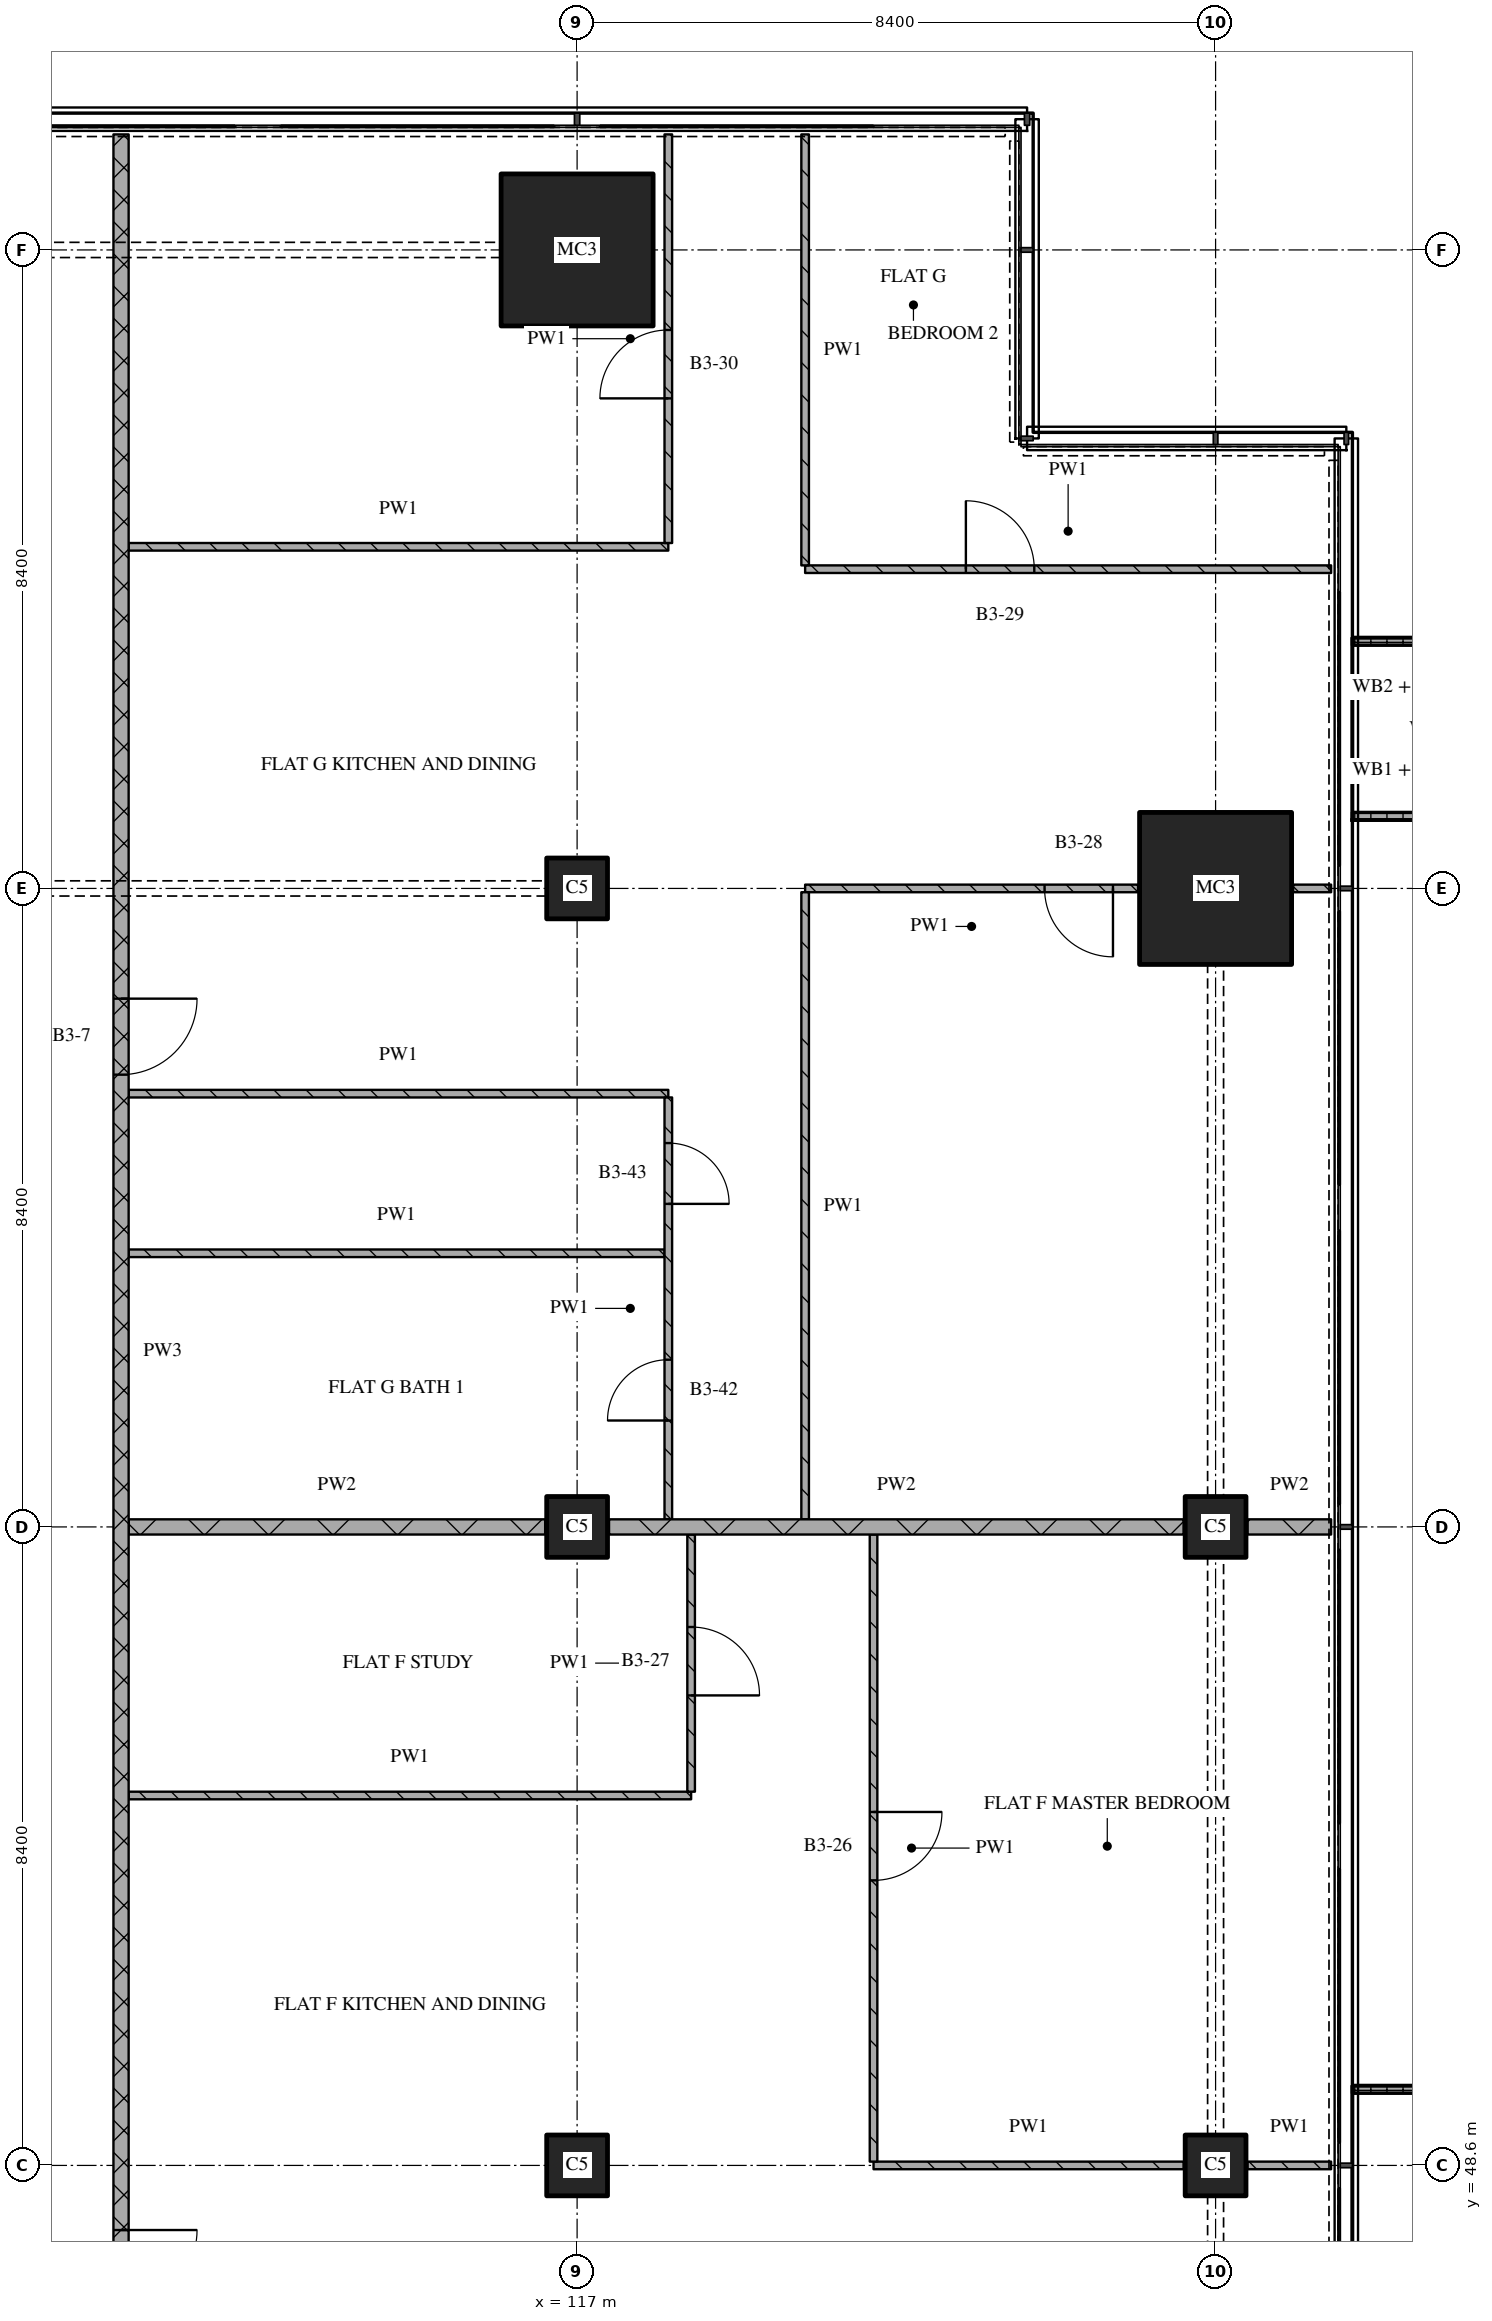
"""IFC4 building model, lengths in metres.
Left out: names, types, materials, properties, quantities, classifications, styles, units other than length and angle.
Written with IfcOpenShell. Run it as: python <this file> out.ifc"""

import sys

from ifc_helpers import new_model, si_unit, direction, frame, frame_2d, origin, origin_2d, place, context, subcontext, project, spatial, polyline, rectangle, outline, extrude, element, fill, save


model = new_model("IFC4")
c1 = context("Model", 3, precision=1e-05, world=origin(), true_north=direction((0.0, 1.0)))
c2 = subcontext(c1, "Body", "Model", "MODEL_VIEW")
j1 = project(units=[si_unit("LENGTHUNIT", "METRE"), si_unit("PLANEANGLEUNIT", "RADIAN")], contexts=[c1])
p1 = place(None, origin())
s1 = spatial("IfcSite", under=j1, at=p1, CompositionType="ELEMENT")
p2 = place(p1, origin())
s2 = spatial("IfcBuilding", under=s1, at=p2, CompositionType="ELEMENT")
p3 = place(p2, frame((0.0, 0.0, 120.45)))
s3 = spatial("IfcBuildingStorey", under=s2, at=p3, CompositionType="ELEMENT", Elevation=120.45)
for number, where, z_axis, x_axis in (
    (1, (117.0, 48.6, 0.0), (0.0, 0.0, 1.0), (1.0, 0.0, 0.0)),
    (2, (117.0, 57.0, 0.0), (0.0, 0.0, 1.0), (1.0, 0.0, 0.0)),
    (3, (117.0, 65.4, 0.0), (0.0, 0.0, 1.0), (1.0, 0.0, 0.0)),
):
    element("IfcColumn", number, at=place(p3, frame(where, z_axis=z_axis, x_axis=x_axis)), inside=s3, PredefinedType="COLUMN", context=c2, shape_type="SweptSolid", body=[
        extrude(rectangle(XDim=0.8, YDim=0.8, at=origin_2d()), origin(), (0.0, 0.0, 1.0), 3.6),
    ])
p4 = place(p3, frame((117.0, 73.8, 0.0), z_axis=(0.0, 0.0, 1.0), x_axis=(1.0, 0.0, 0.0)))
e4 = element("IfcColumn", 4, at=p4, inside=s3, PredefinedType="COLUMN", context=c2, shape_type="SweptSolid", body=[
    extrude(rectangle(XDim=2.0, YDim=2.0, at=origin_2d()), origin(), (0.0, 0.0, 1.0), 3.6),
])
for number, where, z_axis, x_axis in (
    (5, (125.4, 48.6, 0.0), (0.0, 0.0, 1.0), (1.0, 0.0, 0.0)),
    (6, (125.4, 57.0, 0.0), (0.0, 0.0, 1.0), (1.0, 0.0, 0.0)),
):
    element("IfcColumn", number, at=place(p3, frame(where, z_axis=z_axis, x_axis=x_axis)), inside=s3, PredefinedType="COLUMN", context=c2, shape_type="SweptSolid", body=[
        extrude(rectangle(XDim=0.8, YDim=0.8, at=origin_2d()), origin(), (0.0, 0.0, 1.0), 3.6),
    ])
p5 = place(p3, frame((125.4, 65.4, 0.0), z_axis=(0.0, 0.0, 1.0), x_axis=(1.0, 0.0, 0.0)))
e7 = element("IfcColumn", 7, at=p5, inside=s3, PredefinedType="COLUMN", context=c2, shape_type="SweptSolid", body=[
    extrude(rectangle(XDim=2.0, YDim=2.0, at=origin_2d()), origin(), (0.0, 0.0, 1.0), 3.6),
])
p6 = place(p3, origin())
e8 = element("IfcWall", 8, at=p6, inside=s3, PredefinedType="SOLIDWALL", context=c2, shape_type="SweptSolid", body=[
    extrude(outline(polyline([(127.2, 43.35), (127.2, 43.45), (128.967, 43.45), (128.967, 49.55), (127.2, 49.55), (127.2, 49.65), (129.067, 49.65), (129.067, 43.35), (127.2, 43.35)])), origin(), (0.0, 0.0, 1.0), 1.0),
])
p7 = place(p3, origin())
e9 = element("IfcWall", 9, at=p7, inside=s3, PredefinedType="SOLIDWALL", context=c2, shape_type="SweptSolid", body=[
    extrude(outline(polyline([(127.2, 66.3), (127.2, 66.4), (128.7, 66.4), (128.7, 68.6), (127.2, 68.6), (127.2, 68.7), (128.8, 68.7), (128.8, 66.3), (127.2, 66.3)])), origin(), (0.0, 0.0, 1.0), 1.0),
])
p8 = place(p3, frame((120.9, 48.6, 0.0), z_axis=(0.0, 0.0, 1.0), x_axis=(1.0, 0.0, 0.0)))
e10 = element("IfcWall", 10, at=p8, inside=s3, PredefinedType="PARTITIONING", context=c2, shape_type="SweptSolid", body=[
    extrude(rectangle(XDim=4.08, YDim=0.1, at=frame_2d((2.04, 0.0))), origin(), (0.0, 0.0, 1.0), 3.32),
])
p9 = place(p3, frame((125.82, 48.6, 0.0), z_axis=(0.0, 0.0, 1.0), x_axis=(1.0, 0.0, 0.0)))
e11 = element("IfcWall", 11, at=p9, inside=s3, PredefinedType="PARTITIONING", context=c2, shape_type="SweptSolid", body=[
    extrude(rectangle(XDim=1.1, YDim=0.1, at=frame_2d((0.55, 0.0))), origin(), (0.0, 0.0, 1.0), 3.32),
])
p10 = place(p3, frame((111.1, 53.467, 0.0), z_axis=(0.0, 0.0, 1.0), x_axis=(1.0, 0.0, 0.0)))
e12 = element("IfcWall", 12, at=p10, inside=s3, PredefinedType="PARTITIONING", context=c2, shape_type="SweptSolid", body=[
    extrude(rectangle(XDim=7.4, YDim=0.1, at=frame_2d((3.7, 0.0))), origin(), (0.0, 0.0, 1.0), 3.32),
])
p11 = place(p3, frame((111.1, 57.0, 0.0), z_axis=(0.0, 0.0, 1.0), x_axis=(1.0, 0.0, 0.0)))
e13 = element("IfcWall", 13, at=p11, inside=s3, PredefinedType="PARTITIONING", context=c2, shape_type="SweptSolid", body=[
    extrude(rectangle(XDim=5.48, YDim=0.2, at=frame_2d((2.74, 0.0))), origin(), (0.0, 0.0, 1.0), 3.32),
])
p12 = place(p3, frame((117.42, 57.0, 0.0), z_axis=(0.0, 0.0, 1.0), x_axis=(1.0, 0.0, 0.0)))
e14 = element("IfcWall", 14, at=p12, inside=s3, PredefinedType="PARTITIONING", context=c2, shape_type="SweptSolid", body=[
    extrude(rectangle(XDim=7.56, YDim=0.2, at=frame_2d((3.78, 0.0))), origin(), (0.0, 0.0, 1.0), 3.32),
])
p13 = place(p3, frame((125.82, 57.0, 0.0), z_axis=(0.0, 0.0, 1.0), x_axis=(1.0, 0.0, 0.0)))
e15 = element("IfcWall", 15, at=p13, inside=s3, PredefinedType="PARTITIONING", context=c2, shape_type="SweptSolid", body=[
    extrude(rectangle(XDim=1.1, YDim=0.2, at=frame_2d((0.55, 0.0))), origin(), (0.0, 0.0, 1.0), 3.32),
])
p14 = place(p3, frame((111.1, 60.6, 0.0), z_axis=(0.0, 0.0, 1.0), x_axis=(1.0, 0.0, 0.0)))
e16 = element("IfcWall", 16, at=p14, inside=s3, PredefinedType="PARTITIONING", context=c2, shape_type="SweptSolid", body=[
    extrude(rectangle(XDim=7.05, YDim=0.1, at=frame_2d((3.525, 0.0))), origin(), (0.0, 0.0, 1.0), 3.32),
])
p15 = place(p3, frame((111.1, 62.7, 0.0), z_axis=(0.0, 0.0, 1.0), x_axis=(1.0, 0.0, 0.0)))
e17 = element("IfcWall", 17, at=p15, inside=s3, PredefinedType="PARTITIONING", context=c2, shape_type="SweptSolid", body=[
    extrude(rectangle(XDim=7.1, YDim=0.1, at=frame_2d((3.55, 0.0))), origin(), (0.0, 0.0, 1.0), 3.32),
])
p16 = place(p3, frame((124.38, 65.4, 0.0), z_axis=(0.0, 0.0, 1.0), x_axis=(-1.0, 0.0, 0.0)))
e18 = element("IfcWall", 18, at=p16, inside=s3, PredefinedType="PARTITIONING", context=c2, shape_type="SweptSolid", body=[
    extrude(rectangle(XDim=4.38, YDim=0.1, at=frame_2d((2.19, 0.0))), origin(), (0.0, 0.0, 1.0), 3.32),
])
p17 = place(p16, frame((0.33, 0.0, 0.0)))
e19 = element("IfcOpeningElement", 19, at=p17, cuts=e18, PredefinedType="OPENING", context=c2, shape_type="SweptSolid", body=[
    extrude(rectangle(XDim=0.9, YDim=2.1, at=frame_2d((0.45, 1.05))), frame((0.0, 0.06, 0.0), z_axis=(0.0, -1.0, 0.0), x_axis=(1.0, 0.0, 0.0)), (0.0, 0.0, 1.0), 0.12),
])
p18 = place(p3, frame((126.42, 65.4, 0.0), z_axis=(0.0, 0.0, 1.0), x_axis=(1.0, 0.0, 0.0)))
e20 = element("IfcWall", 20, at=p18, inside=s3, PredefinedType="PARTITIONING", context=c2, shape_type="SweptSolid", body=[
    extrude(rectangle(XDim=0.5, YDim=0.1, at=frame_2d((0.25, 0.0))), origin(), (0.0, 0.0, 1.0), 3.32),
])
p19 = place(p3, frame((120.0, 69.6, 0.0), z_axis=(0.0, 0.0, 1.0), x_axis=(1.0, 0.0, 0.0)))
e21 = element("IfcWall", 21, at=p19, inside=s3, PredefinedType="PARTITIONING", context=c2, shape_type="SweptSolid", body=[
    extrude(rectangle(XDim=6.92, YDim=0.1, at=frame_2d((3.46, 0.0))), origin(), (0.0, 0.0, 1.0), 3.32),
])
p20 = place(p19, frame((2.115, 0.0, 0.0)))
e22 = element("IfcOpeningElement", 22, at=p20, cuts=e21, PredefinedType="OPENING", context=c2, shape_type="SweptSolid", body=[
    extrude(rectangle(XDim=0.9, YDim=2.1, at=frame_2d((0.45, 1.05))), frame((0.0, 0.06, 0.0), z_axis=(0.0, -1.0, 0.0), x_axis=(1.0, 0.0, 0.0)), (0.0, 0.0, 1.0), 0.12),
])
p21 = place(p3, frame((111.1, 69.894, 0.0), z_axis=(0.0, 0.0, 1.0), x_axis=(1.0, 0.0, 0.0)))
e23 = element("IfcWall", 23, at=p21, inside=s3, PredefinedType="PARTITIONING", context=c2, shape_type="SweptSolid", body=[
    extrude(rectangle(XDim=7.1, YDim=0.1, at=frame_2d((3.55, 0.0))), origin(), (0.0, 0.0, 1.0), 3.32),
])
p22 = place(p3, frame((111.0, 75.32, 0.0), z_axis=(0.0, 0.0, 1.0), x_axis=(0.0, -1.0, 0.0)))
e24 = element("IfcWall", 24, at=p22, inside=s3, PredefinedType="PARTITIONING", context=c2, shape_type="SweptSolid", body=[
    extrude(rectangle(XDim=32.02, YDim=0.2, at=frame_2d((16.01, 0.0))), origin(), (0.0, 0.0, 1.0), 3.32),
])
p23 = place(p22, frame((11.37, 0.0, 0.0)))
e25 = element("IfcOpeningElement", 25, at=p23, cuts=e24, PredefinedType="OPENING", context=c2, shape_type="SweptSolid", body=[
    extrude(rectangle(XDim=1.0, YDim=2.1, at=frame_2d((0.5, 1.05))), frame((0.0, 0.11, 0.0), z_axis=(0.0, -1.0, 0.0), x_axis=(1.0, 0.0, 0.0)), (0.0, 0.0, 1.0), 0.22),
])
p24 = place(p22, frame((27.57, 0.0, 0.0)))
e26 = element("IfcOpeningElement", 26, at=p24, cuts=e24, PredefinedType="OPENING", context=c2, shape_type="SweptSolid", body=[
    extrude(rectangle(XDim=1.0, YDim=2.1, at=frame_2d((0.5, 1.05))), frame((0.0, 0.11, 0.0), z_axis=(0.0, -1.0, 0.0), x_axis=(1.0, 0.0, 0.0)), (0.0, 0.0, 1.0), 0.22),
])
p25 = place(p3, frame((118.2, 57.1, 0.0), z_axis=(0.0, 0.0, 1.0), x_axis=(0.0, 1.0, 0.0)))
e27 = element("IfcWall", 27, at=p25, inside=s3, PredefinedType="PARTITIONING", context=c2, shape_type="SweptSolid", body=[
    extrude(rectangle(XDim=5.55, YDim=0.1, at=frame_2d((2.775, 0.0))), origin(), (0.0, 0.0, 1.0), 3.32),
])
p26 = place(p25, frame((1.3, 0.0, 0.0)))
e28 = element("IfcOpeningElement", 28, at=p26, cuts=e27, PredefinedType="OPENING", context=c2, shape_type="SweptSolid", body=[
    extrude(rectangle(XDim=0.8, YDim=2.1, at=frame_2d((0.4, 1.05))), frame((0.0, 0.06, 0.0), z_axis=(0.0, -1.0, 0.0), x_axis=(1.0, 0.0, 0.0)), (0.0, 0.0, 1.0), 0.12),
])
p27 = place(p25, frame((4.15, 0.0, 0.0)))
e29 = element("IfcOpeningElement", 29, at=p27, cuts=e27, PredefinedType="OPENING", context=c2, shape_type="SweptSolid", body=[
    extrude(rectangle(XDim=0.8, YDim=2.1, at=frame_2d((0.4, 1.05))), frame((0.0, 0.06, 0.0), z_axis=(0.0, -1.0, 0.0), x_axis=(1.0, 0.0, 0.0)), (0.0, 0.0, 1.0), 0.12),
])
p28 = place(p3, frame((118.2, 69.944, 0.0), z_axis=(0.0, 0.0, 1.0), x_axis=(0.0, 1.0, 0.0)))
e30 = element("IfcWall", 30, at=p28, inside=s3, PredefinedType="PARTITIONING", context=c2, shape_type="SweptSolid", body=[
    extrude(rectangle(XDim=5.376, YDim=0.1, at=frame_2d((2.688, 0.0))), origin(), (0.0, 0.0, 1.0), 3.32),
])
p29 = place(p28, frame((1.903, 0.0, 0.0)))
e31 = element("IfcOpeningElement", 31, at=p29, cuts=e30, PredefinedType="OPENING", context=c2, shape_type="SweptSolid", body=[
    extrude(rectangle(XDim=0.9, YDim=2.1, at=frame_2d((0.45, 1.05))), frame((0.0, 0.06, 0.0), z_axis=(0.0, -1.0, 0.0), x_axis=(1.0, 0.0, 0.0)), (0.0, 0.0, 1.0), 0.12),
])
p30 = place(p3, frame((118.5, 53.517, 0.0), z_axis=(0.0, 0.0, 1.0), x_axis=(0.0, 1.0, 0.0)))
e32 = element("IfcWall", 32, at=p30, inside=s3, PredefinedType="PARTITIONING", context=c2, shape_type="SweptSolid", body=[
    extrude(rectangle(XDim=3.383, YDim=0.1, at=frame_2d((1.692, 0.0))), origin(), (0.0, 0.0, 1.0), 3.32),
])
p31 = place(p30, frame((1.267, 0.0, 0.0)))
e33 = element("IfcOpeningElement", 33, at=p31, cuts=e32, PredefinedType="OPENING", context=c2, shape_type="SweptSolid", body=[
    extrude(rectangle(XDim=0.9, YDim=2.1, at=frame_2d((0.45, 1.05))), frame((0.0, 0.06, 0.0), z_axis=(0.0, -1.0, 0.0), x_axis=(1.0, 0.0, 0.0)), (0.0, 0.0, 1.0), 0.12),
])
p32 = place(p3, frame((120.0, 65.35, 0.0), z_axis=(0.0, 0.0, 1.0), x_axis=(0.0, -1.0, 0.0)))
e34 = element("IfcWall", 34, at=p32, inside=s3, PredefinedType="PARTITIONING", context=c2, shape_type="SweptSolid", body=[
    extrude(rectangle(XDim=8.25, YDim=0.1, at=frame_2d((4.125, 0.0))), origin(), (0.0, 0.0, 1.0), 3.32),
])
p33 = place(p3, frame((120.0, 75.32, 0.0), z_axis=(0.0, 0.0, 1.0), x_axis=(0.0, -1.0, 0.0)))
e35 = element("IfcWall", 35, at=p33, inside=s3, PredefinedType="PARTITIONING", context=c2, shape_type="SweptSolid", body=[
    extrude(rectangle(XDim=5.67, YDim=0.1, at=frame_2d((2.835, 0.0))), origin(), (0.0, 0.0, 1.0), 3.32),
])
p34 = place(p3, frame((120.9, 56.9, 0.0), z_axis=(0.0, 0.0, 1.0), x_axis=(0.0, -1.0, 0.0)))
e36 = element("IfcWall", 36, at=p34, inside=s3, PredefinedType="PARTITIONING", context=c2, shape_type="SweptSolid", body=[
    extrude(rectangle(XDim=8.25, YDim=0.1, at=frame_2d((4.125, 0.0))), origin(), (0.0, 0.0, 1.0), 3.32),
])
p35 = place(p34, frame((3.65, 0.0, 0.0)))
e37 = element("IfcOpeningElement", 37, at=p35, cuts=e36, PredefinedType="OPENING", context=c2, shape_type="SweptSolid", body=[
    extrude(rectangle(XDim=0.9, YDim=2.1, at=frame_2d((0.45, 1.05))), frame((0.0, 0.06, 0.0), z_axis=(0.0, -1.0, 0.0), x_axis=(1.0, 0.0, 0.0)), (0.0, 0.0, 1.0), 0.12),
])
p36 = place(p17, origin())
e38 = element("IfcDoor", 38, at=p36, inside=s3, OperationType="SINGLE_SWING_LEFT", PredefinedType="DOOR", context=c2, shape_type="SweptSolid", body=[
    extrude(rectangle(XDim=0.9, YDim=2.1, at=frame_2d((0.45, 1.05))), frame((0.0, 0.025, 0.0), z_axis=(0.0, -1.0, 0.0), x_axis=(1.0, 0.0, 0.0)), (0.0, 0.0, 1.0), 0.05),
])
fill(e19, e38)
p37 = place(p20, origin())
e39 = element("IfcDoor", 39, at=p37, inside=s3, OperationType="SINGLE_SWING_LEFT", PredefinedType="DOOR", context=c2, shape_type="SweptSolid", body=[
    extrude(rectangle(XDim=0.9, YDim=2.1, at=frame_2d((0.45, 1.05))), frame((0.0, 0.025, 0.0), z_axis=(0.0, -1.0, 0.0), x_axis=(1.0, 0.0, 0.0)), (0.0, 0.0, 1.0), 0.05),
])
fill(e22, e39)
p38 = place(p23, origin())
e40 = element("IfcDoor", 40, at=p38, inside=s3, OperationType="SINGLE_SWING_LEFT", PredefinedType="DOOR", context=c2, shape_type="SweptSolid", body=[
    extrude(rectangle(XDim=1.0, YDim=2.1, at=frame_2d((0.5, 1.05))), frame((0.0, 0.025, 0.0), z_axis=(0.0, -1.0, 0.0), x_axis=(1.0, 0.0, 0.0)), (0.0, 0.0, 1.0), 0.05),
])
fill(e25, e40)
p39 = place(p24, origin())
e41 = element("IfcDoor", 41, at=p39, inside=s3, OperationType="SINGLE_SWING_LEFT", PredefinedType="DOOR", context=c2, shape_type="SweptSolid", body=[
    extrude(rectangle(XDim=1.0, YDim=2.1, at=frame_2d((0.5, 1.05))), frame((0.0, 0.025, 0.0), z_axis=(0.0, -1.0, 0.0), x_axis=(1.0, 0.0, 0.0)), (0.0, 0.0, 1.0), 0.05),
])
fill(e26, e41)
p40 = place(p26, origin())
e42 = element("IfcDoor", 42, at=p40, inside=s3, OperationType="SINGLE_SWING_LEFT", PredefinedType="DOOR", context=c2, shape_type="SweptSolid", body=[
    extrude(rectangle(XDim=0.8, YDim=2.1, at=frame_2d((0.4, 1.05))), frame((0.0, 0.025, 0.0), z_axis=(0.0, -1.0, 0.0), x_axis=(1.0, 0.0, 0.0)), (0.0, 0.0, 1.0), 0.05),
])
fill(e28, e42)
p41 = place(p27, origin())
e43 = element("IfcDoor", 43, at=p41, inside=s3, OperationType="SINGLE_SWING_RIGHT", PredefinedType="DOOR", context=c2, shape_type="SweptSolid", body=[
    extrude(rectangle(XDim=0.8, YDim=2.1, at=frame_2d((0.4, 1.05))), frame((0.0, 0.025, 0.0), z_axis=(0.0, -1.0, 0.0), x_axis=(1.0, 0.0, 0.0)), (0.0, 0.0, 1.0), 0.05),
])
fill(e29, e43)
p42 = place(p29, origin())
e44 = element("IfcDoor", 44, at=p42, inside=s3, OperationType="SINGLE_SWING_LEFT", PredefinedType="DOOR", context=c2, shape_type="SweptSolid", body=[
    extrude(rectangle(XDim=0.9, YDim=2.1, at=frame_2d((0.45, 1.05))), frame((0.0, 0.025, 0.0), z_axis=(0.0, -1.0, 0.0), x_axis=(1.0, 0.0, 0.0)), (0.0, 0.0, 1.0), 0.05),
])
fill(e31, e44)
p43 = place(p31, origin())
e45 = element("IfcDoor", 45, at=p43, inside=s3, OperationType="SINGLE_SWING_RIGHT", PredefinedType="DOOR", context=c2, shape_type="SweptSolid", body=[
    extrude(rectangle(XDim=0.9, YDim=2.1, at=frame_2d((0.45, 1.05))), frame((0.0, 0.025, 0.0), z_axis=(0.0, -1.0, 0.0), x_axis=(1.0, 0.0, 0.0)), (0.0, 0.0, 1.0), 0.05),
])
fill(e33, e45)
p44 = place(p35, origin())
e46 = element("IfcDoor", 46, at=p44, inside=s3, OperationType="SINGLE_SWING_LEFT", PredefinedType="DOOR", context=c2, shape_type="SweptSolid", body=[
    extrude(rectangle(XDim=0.9, YDim=2.1, at=frame_2d((0.45, 1.05))), frame((0.0, 0.025, 0.0), z_axis=(0.0, -1.0, 0.0), x_axis=(1.0, 0.0, 0.0)), (0.0, 0.0, 1.0), 0.05),
])
fill(e37, e46)
save(model, sys.argv[1])
